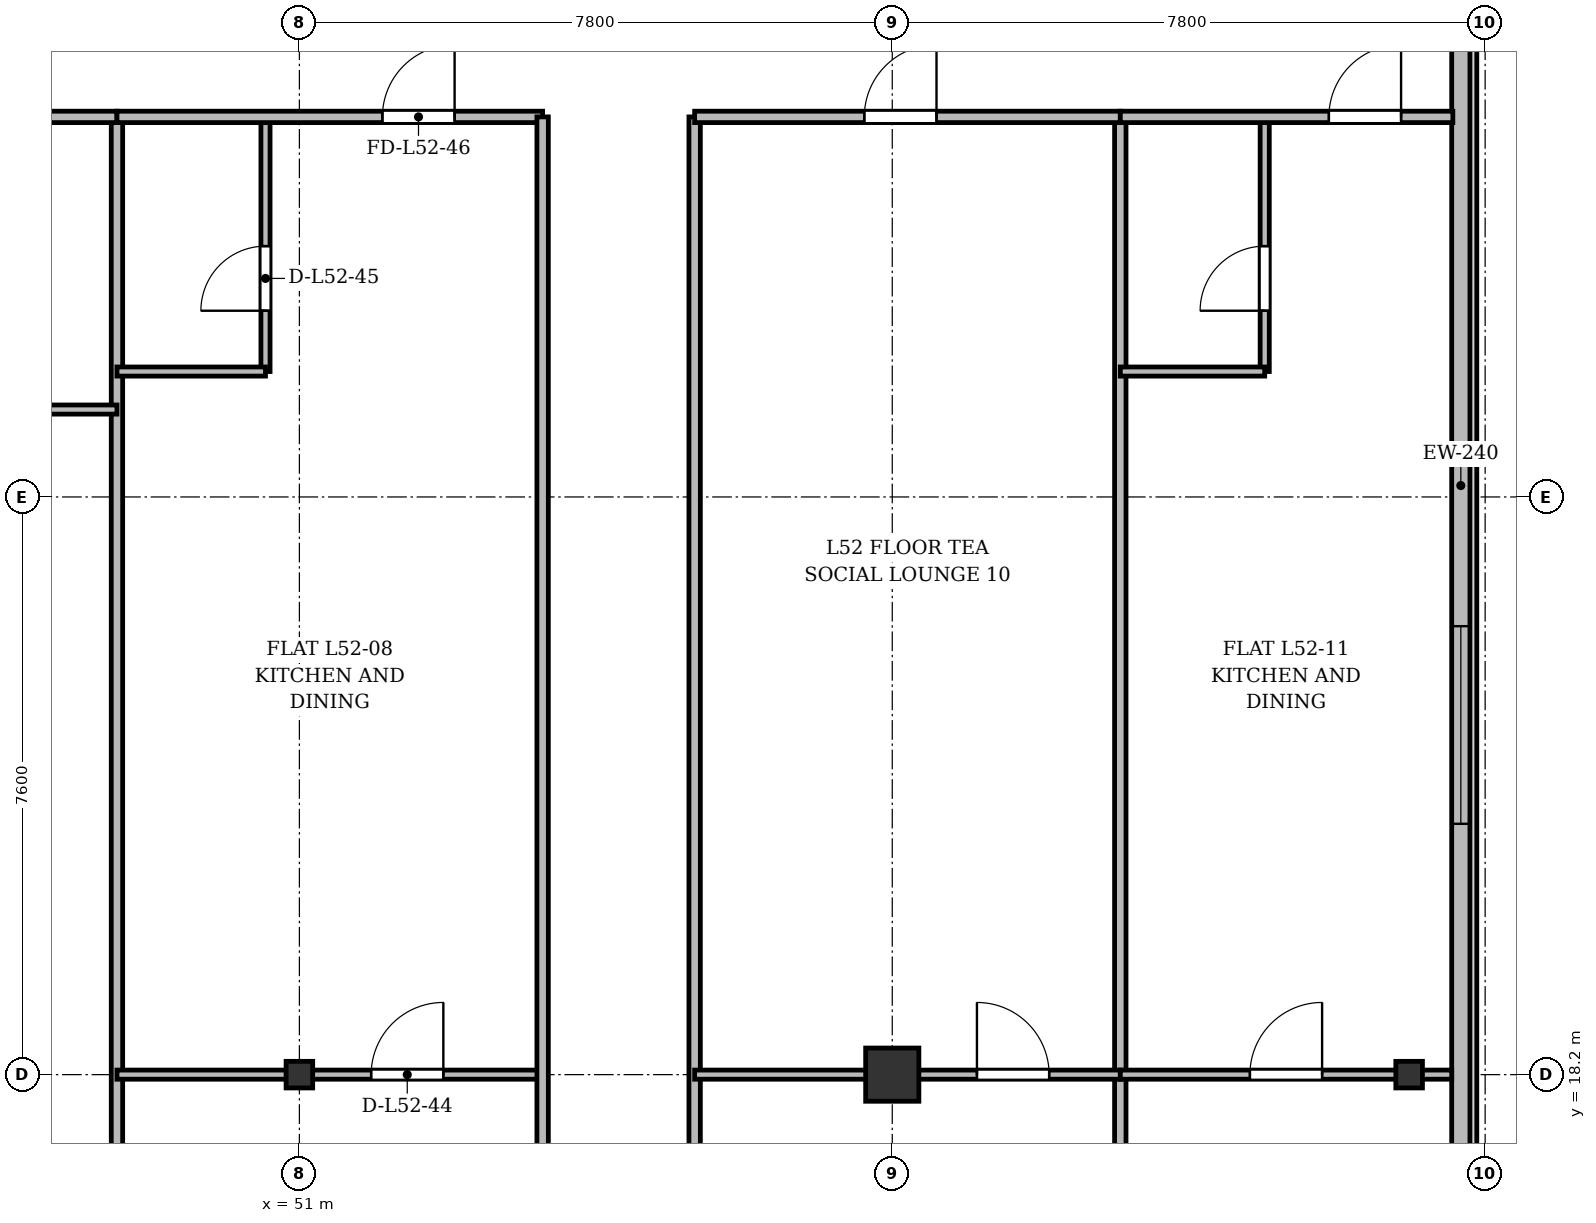
"""IFC4 building model, lengths in metres.
Left out: names, types, materials, properties, quantities, classifications, styles, units other than length and angle.
Written with IfcOpenShell. Run it as: python <this file> out.ifc"""

import sys

from ifc_helpers import new_model, si_unit, direction, frame, frame_2d, origin, origin_2d, place, context, subcontext, project, spatial, rectangle, i_section, extrude, source, transform, mapped, element, fill, save


model = new_model("IFC4")
c1 = context("Model", 3, precision=1e-05, world=origin(), true_north=direction((0.0, 1.0)))
c2 = subcontext(c1, "Body", "Model", "MODEL_VIEW")
j1 = project(units=[si_unit("LENGTHUNIT", "METRE"), si_unit("PLANEANGLEUNIT", "RADIAN")], contexts=[c1])
p1 = place(None, origin())
s1 = spatial("IfcSite", under=j1, at=p1, CompositionType="ELEMENT")
p2 = place(p1, origin())
s2 = spatial("IfcBuilding", under=s1, at=p2, CompositionType="ELEMENT")
p3 = place(p2, frame((0.0, 0.0, 201.3)))
s3 = spatial("IfcBuildingStorey", under=s2, at=p3, CompositionType="ELEMENT", Elevation=201.3)
m1 = source(origin(), c2, "Body", "SweptSolid", [
    extrude(i_section(OverallWidth=0.35, OverallDepth=0.35, WebThickness=0.018, FlangeThickness=0.028, at=origin_2d()), origin(), (0.0, 0.0, 1.0), 3.6),
])
p4 = place(p3, frame((51.0, 18.2, 0.0), z_axis=(0.0, 0.0, 1.0), x_axis=(1.0, 0.0, 0.0)))
e1 = element("IfcColumn", 1, at=p4, inside=s3, PredefinedType="COLUMN", context=c2, shape_type="MappedRepresentation", body=[
    mapped(m1, transform((0.0, 0.0, 0.0), x_axis=(1.0, 0.0, 0.0), y_axis=(0.0, 1.0, 0.0), z_axis=(0.0, 0.0, 1.0), scale=1.0)),
])
m2 = source(origin(), c2, "Body", "SweptSolid", [
    extrude(rectangle(XDim=0.7, YDim=0.7, at=origin_2d()), origin(), (0.0, 0.0, 1.0), 3.6),
])
p5 = place(p3, frame((58.8, 18.2, 0.0), z_axis=(0.0, 0.0, 1.0), x_axis=(1.0, 0.0, 0.0)))
e2 = element("IfcColumn", 2, at=p5, inside=s3, PredefinedType="COLUMN", context=c2, shape_type="MappedRepresentation", body=[
    mapped(m2, transform((0.0, 0.0, 0.0), x_axis=(1.0, 0.0, 0.0), y_axis=(0.0, 1.0, 0.0), z_axis=(0.0, 0.0, 1.0), scale=1.0)),
])
p6 = place(p3, frame((65.6, 18.2, 0.0), z_axis=(0.0, 0.0, 1.0), x_axis=(1.0, 0.0, 0.0)))
e3 = element("IfcColumn", 3, at=p6, inside=s3, PredefinedType="COLUMN", context=c2, shape_type="MappedRepresentation", body=[
    mapped(m1, transform((0.0, 0.0, 0.0), x_axis=(1.0, 0.0, 0.0), y_axis=(0.0, 1.0, 0.0), z_axis=(0.0, 0.0, 1.0), scale=1.0)),
])
p7 = place(p3, frame((66.28, 45.5, 0.0), z_axis=(0.0, 0.0, 1.0), x_axis=(0.0, -1.0, 0.0)))
e4 = element("IfcWall", 4, at=p7, inside=s3, PredefinedType="SOLIDWALL", context=c2, shape_type="SweptSolid", body=[
    extrude(rectangle(XDim=39.1, YDim=0.24, at=frame_2d((19.55, 0.0))), origin(), (0.0, 0.0, 1.0), 3.22),
])
p8 = place(p7, frame((36.45, 0.0, 0.92)))
e5 = element("IfcOpeningElement", 5, at=p8, cuts=e4, PredefinedType="OPENING", context=c2, shape_type="SweptSolid", body=[
    extrude(rectangle(XDim=1.2, YDim=1.65, at=frame_2d((0.6, 0.825))), frame((0.0, 0.13, 0.0), z_axis=(0.0, -1.0, 0.0), x_axis=(1.0, 0.0, 0.0)), (0.0, 0.0, 1.0), 0.26),
])
p9 = place(p7, frame((32.8, 0.0, 0.92)))
e6 = element("IfcOpeningElement", 6, at=p9, cuts=e4, PredefinedType="OPENING", context=c2, shape_type="SweptSolid", body=[
    extrude(rectangle(XDim=2.6, YDim=1.9, at=frame_2d((1.3, 0.95))), frame((0.0, 0.13, 0.0), z_axis=(0.0, -1.0, 0.0), x_axis=(1.0, 0.0, 0.0)), (0.0, 0.0, 1.0), 0.26),
])
p10 = place(p7, frame((28.6, 0.0, 0.92)))
e7 = element("IfcOpeningElement", 7, at=p10, cuts=e4, PredefinedType="OPENING", context=c2, shape_type="SweptSolid", body=[
    extrude(rectangle(XDim=2.6, YDim=1.9, at=frame_2d((1.3, 0.95))), frame((0.0, 0.13, 0.0), z_axis=(0.0, -1.0, 0.0), x_axis=(1.0, 0.0, 0.0)), (0.0, 0.0, 1.0), 0.26),
])
p11 = place(p7, frame((21.4, 0.0, 0.92)))
e8 = element("IfcOpeningElement", 8, at=p11, cuts=e4, PredefinedType="OPENING", context=c2, shape_type="SweptSolid", body=[
    extrude(rectangle(XDim=2.6, YDim=1.9, at=frame_2d((1.3, 0.95))), frame((0.0, 0.13, 0.0), z_axis=(0.0, -1.0, 0.0), x_axis=(1.0, 0.0, 0.0)), (0.0, 0.0, 1.0), 0.26),
])
p12 = place(p7, frame((7.4, 0.0, 0.92)))
e9 = element("IfcOpeningElement", 9, at=p12, cuts=e4, PredefinedType="OPENING", context=c2, shape_type="SweptSolid", body=[
    extrude(rectangle(XDim=2.6, YDim=1.9, at=frame_2d((1.3, 0.95))), frame((0.0, 0.13, 0.0), z_axis=(0.0, -1.0, 0.0), x_axis=(1.0, 0.0, 0.0)), (0.0, 0.0, 1.0), 0.26),
])
p13 = place(p7, frame((4.5, 0.0, 0.92)))
e10 = element("IfcOpeningElement", 10, at=p13, cuts=e4, PredefinedType="OPENING", context=c2, shape_type="SweptSolid", body=[
    extrude(rectangle(XDim=1.2, YDim=1.65, at=frame_2d((0.6, 0.825))), frame((0.0, 0.13, 0.0), z_axis=(0.0, -1.0, 0.0), x_axis=(1.0, 0.0, 0.0)), (0.0, 0.0, 1.0), 0.26),
])
p14 = place(p7, frame((1.15, 0.0, 0.92)))
e11 = element("IfcOpeningElement", 11, at=p14, cuts=e4, PredefinedType="OPENING", context=c2, shape_type="SweptSolid", body=[
    extrude(rectangle(XDim=1.2, YDim=1.65, at=frame_2d((0.6, 0.825))), frame((0.0, 0.13, 0.0), z_axis=(0.0, -1.0, 0.0), x_axis=(1.0, 0.0, 0.0)), (0.0, 0.0, 1.0), 0.26),
])
for number, where, z_axis, x_axis in (
    (12, (48.6, 3.625, 0.0), (0.0, 0.0, 1.0), (0.0, 1.0, 0.0)),
    (13, (61.8, 3.625, 0.0), (0.0, 0.0, 1.0), (0.0, 1.0, 0.0)),
):
    element("IfcWall", number, at=place(p3, frame(where, z_axis=z_axis, x_axis=x_axis)), inside=s3, PredefinedType="PARTITIONING", context=c2, shape_type="SweptSolid", body=[
        extrude(rectangle(XDim=27.175, YDim=0.15, at=frame_2d((13.587, 0.0))), origin(), (0.0, 0.0, 1.0), 2.77),
    ])
p15 = place(p3, frame((44.0, 30.8, 0.0), z_axis=(0.0, 0.0, 1.0), x_axis=(1.0, 0.0, 0.0)))
e14 = element("IfcWall", 14, at=p15, inside=s3, PredefinedType="PARTITIONING", context=c2, shape_type="SweptSolid", body=[
    extrude(rectangle(XDim=4.6, YDim=0.15, at=frame_2d((2.3, 0.0))), origin(), (0.0, 0.0, 1.0), 3.22),
])
p16 = place(p15, frame((1.825, 0.0, 0.0)))
e15 = element("IfcOpeningElement", 15, at=p16, cuts=e14, PredefinedType="OPENING", context=c2, shape_type="SweptSolid", body=[
    extrude(rectangle(XDim=0.95, YDim=2.15, at=frame_2d((0.475, 1.075))), frame((0.0, 0.085, 0.0), z_axis=(0.0, -1.0, 0.0), x_axis=(1.0, 0.0, 0.0)), (0.0, 0.0, 1.0), 0.17),
])
p17 = place(p3, frame((44.025, 26.95, 0.0), z_axis=(0.0, 0.0, 1.0), x_axis=(1.0, 0.0, 0.0)))
e16 = element("IfcWall", 16, at=p17, inside=s3, PredefinedType="PARTITIONING", context=c2, shape_type="SweptSolid", body=[
    extrude(rectangle(XDim=4.575, YDim=0.12, at=frame_2d((2.288, 0.0))), origin(), (0.0, 0.0, 1.0), 3.22),
])
p18 = place(p17, frame((1.717, 0.0, 0.0)))
e17 = element("IfcOpeningElement", 17, at=p18, cuts=e16, PredefinedType="OPENING", context=c2, shape_type="SweptSolid", body=[
    extrude(rectangle(XDim=0.95, YDim=2.15, at=frame_2d((0.475, 1.075))), frame((0.0, 0.07, 0.0), z_axis=(0.0, -1.0, 0.0), x_axis=(1.0, 0.0, 0.0)), (0.0, 0.0, 1.0), 0.14),
])
p19 = place(p3, frame((48.6, 18.2, 0.0), z_axis=(0.0, 0.0, 1.0), x_axis=(1.0, 0.0, 0.0)))
e18 = element("IfcWall", 18, at=p19, inside=s3, PredefinedType="PARTITIONING", context=c2, shape_type="SweptSolid", body=[
    extrude(rectangle(XDim=5.6, YDim=0.12, at=frame_2d((2.8, 0.0))), origin(), (0.0, 0.0, 1.0), 2.77),
])
p20 = place(p19, frame((3.344, 0.0, 0.0)))
e19 = element("IfcOpeningElement", 19, at=p20, cuts=e18, PredefinedType="OPENING", context=c2, shape_type="SweptSolid", body=[
    extrude(rectangle(XDim=0.95, YDim=2.15, at=frame_2d((0.475, 1.075))), frame((0.0, 0.07, 0.0), z_axis=(0.0, -1.0, 0.0), x_axis=(1.0, 0.0, 0.0)), (0.0, 0.0, 1.0), 0.14),
])
p21 = place(p3, frame((50.554, 27.45, 0.0), z_axis=(0.0, 0.0, 1.0), x_axis=(0.0, 1.0, 0.0)))
e20 = element("IfcWall", 20, at=p21, inside=s3, PredefinedType="PARTITIONING", context=c2, shape_type="SweptSolid", body=[
    extrude(rectangle(XDim=3.35, YDim=0.12, at=frame_2d((1.675, 0.0))), origin(), (0.0, 0.0, 1.0), 3.22),
])
p22 = place(p21, frame((0.8, 0.0, 0.0)))
e21 = element("IfcOpeningElement", 21, at=p22, cuts=e20, PredefinedType="OPENING", context=c2, shape_type="SweptSolid", body=[
    extrude(rectangle(XDim=0.85, YDim=2.1, at=frame_2d((0.425, 1.05))), frame((0.0, 0.07, 0.0), z_axis=(0.0, -1.0, 0.0), x_axis=(1.0, 0.0, 0.0)), (0.0, 0.0, 1.0), 0.14),
])
p23 = place(p3, frame((48.6, 27.45, 0.0), z_axis=(0.0, 0.0, 1.0), x_axis=(1.0, 0.0, 0.0)))
e22 = element("IfcWall", 22, at=p23, inside=s3, PredefinedType="PARTITIONING", context=c2, shape_type="SweptSolid", body=[
    extrude(rectangle(XDim=1.954, YDim=0.12, at=frame_2d((0.977, 0.0))), origin(), (0.0, 0.0, 1.0), 3.22),
])
p24 = place(p3, frame((48.6, 30.8, 0.0), z_axis=(0.0, 0.0, 1.0), x_axis=(1.0, 0.0, 0.0)))
e23 = element("IfcWall", 23, at=p24, inside=s3, PredefinedType="PARTITIONING", context=c2, shape_type="SweptSolid", body=[
    extrude(rectangle(XDim=5.6, YDim=0.15, at=frame_2d((2.8, 0.0))), origin(), (0.0, 0.0, 1.0), 2.72),
])
p25 = place(p24, frame((3.492, 0.0, 0.0)))
e24 = element("IfcOpeningElement", 24, at=p25, cuts=e23, PredefinedType="OPENING", context=c2, shape_type="SweptSolid", body=[
    extrude(rectangle(XDim=0.95, YDim=2.15, at=frame_2d((0.475, 1.075))), frame((0.0, 0.085, 0.0), z_axis=(0.0, -1.0, 0.0), x_axis=(1.0, 0.0, 0.0)), (0.0, 0.0, 1.0), 0.17),
])
for number, where, z_axis, x_axis in (
    (25, (54.2, 3.625, 0.0), (0.0, 0.0, 1.0), (0.0, 1.0, 0.0)),
    (26, (56.2, 3.625, 0.0), (0.0, 0.0, 1.0), (0.0, 1.0, 0.0)),
):
    element("IfcWall", number, at=place(p3, frame(where, z_axis=z_axis, x_axis=x_axis)), inside=s3, PredefinedType="PARTITIONING", context=c2, shape_type="SweptSolid", body=[
        extrude(rectangle(XDim=27.175, YDim=0.15, at=frame_2d((13.587, 0.0))), origin(), (0.0, 0.0, 1.0), 2.77),
    ])
p26 = place(p3, frame((56.2, 30.8, 0.0), z_axis=(0.0, 0.0, 1.0), x_axis=(1.0, 0.0, 0.0)))
e27 = element("IfcWall", 27, at=p26, inside=s3, PredefinedType="PARTITIONING", context=c2, shape_type="SweptSolid", body=[
    extrude(rectangle(XDim=5.6, YDim=0.15, at=frame_2d((2.8, 0.0))), origin(), (0.0, 0.0, 1.0), 2.72),
])
p27 = place(p26, frame((2.232, 0.0, 0.0)))
e28 = element("IfcOpeningElement", 28, at=p27, cuts=e27, PredefinedType="OPENING", context=c2, shape_type="SweptSolid", body=[
    extrude(rectangle(XDim=0.95, YDim=2.15, at=frame_2d((0.475, 1.075))), frame((0.0, 0.085, 0.0), z_axis=(0.0, -1.0, 0.0), x_axis=(1.0, 0.0, 0.0)), (0.0, 0.0, 1.0), 0.17),
])
p28 = place(p3, frame((56.2, 18.2, 0.0), z_axis=(0.0, 0.0, 1.0), x_axis=(1.0, 0.0, 0.0)))
e29 = element("IfcWall", 29, at=p28, inside=s3, PredefinedType="PARTITIONING", context=c2, shape_type="SweptSolid", body=[
    extrude(rectangle(XDim=5.6, YDim=0.12, at=frame_2d((2.8, 0.0))), origin(), (0.0, 0.0, 1.0), 2.77),
])
p29 = place(p28, frame((3.714, 0.0, 0.0)))
e30 = element("IfcOpeningElement", 30, at=p29, cuts=e29, PredefinedType="OPENING", context=c2, shape_type="SweptSolid", body=[
    extrude(rectangle(XDim=0.95, YDim=2.15, at=frame_2d((0.475, 1.075))), frame((0.0, 0.07, 0.0), z_axis=(0.0, -1.0, 0.0), x_axis=(1.0, 0.0, 0.0)), (0.0, 0.0, 1.0), 0.14),
])
p30 = place(p3, frame((61.8, 18.2, 0.0), z_axis=(0.0, 0.0, 1.0), x_axis=(1.0, 0.0, 0.0)))
e31 = element("IfcWall", 31, at=p30, inside=s3, PredefinedType="PARTITIONING", context=c2, shape_type="SweptSolid", body=[
    extrude(rectangle(XDim=4.36, YDim=0.12, at=frame_2d((2.18, 0.0))), origin(), (0.0, 0.0, 1.0), 2.77),
])
p31 = place(p30, frame((1.705, 0.0, 0.0)))
e32 = element("IfcOpeningElement", 32, at=p31, cuts=e31, PredefinedType="OPENING", context=c2, shape_type="SweptSolid", body=[
    extrude(rectangle(XDim=0.95, YDim=2.15, at=frame_2d((0.475, 1.075))), frame((0.0, 0.07, 0.0), z_axis=(0.0, -1.0, 0.0), x_axis=(1.0, 0.0, 0.0)), (0.0, 0.0, 1.0), 0.14),
])
p32 = place(p3, frame((63.7, 27.45, 0.0), z_axis=(0.0, 0.0, 1.0), x_axis=(0.0, 1.0, 0.0)))
e33 = element("IfcWall", 33, at=p32, inside=s3, PredefinedType="PARTITIONING", context=c2, shape_type="SweptSolid", body=[
    extrude(rectangle(XDim=3.35, YDim=0.12, at=frame_2d((1.675, 0.0))), origin(), (0.0, 0.0, 1.0), 3.22),
])
p33 = place(p32, frame((0.8, 0.0, 0.0)))
e34 = element("IfcOpeningElement", 34, at=p33, cuts=e33, PredefinedType="OPENING", context=c2, shape_type="SweptSolid", body=[
    extrude(rectangle(XDim=0.85, YDim=2.1, at=frame_2d((0.425, 1.05))), frame((0.0, 0.07, 0.0), z_axis=(0.0, -1.0, 0.0), x_axis=(1.0, 0.0, 0.0)), (0.0, 0.0, 1.0), 0.14),
])
p34 = place(p3, frame((61.8, 27.45, 0.0), z_axis=(0.0, 0.0, 1.0), x_axis=(1.0, 0.0, 0.0)))
e35 = element("IfcWall", 35, at=p34, inside=s3, PredefinedType="PARTITIONING", context=c2, shape_type="SweptSolid", body=[
    extrude(rectangle(XDim=1.9, YDim=0.12, at=frame_2d((0.95, 0.0))), origin(), (0.0, 0.0, 1.0), 3.22),
])
p35 = place(p3, frame((61.8, 30.8, 0.0), z_axis=(0.0, 0.0, 1.0), x_axis=(1.0, 0.0, 0.0)))
e36 = element("IfcWall", 36, at=p35, inside=s3, PredefinedType="PARTITIONING", context=c2, shape_type="SweptSolid", body=[
    extrude(rectangle(XDim=4.375, YDim=0.15, at=frame_2d((2.188, 0.0))), origin(), (0.0, 0.0, 1.0), 2.72),
])
p36 = place(p35, frame((2.744, 0.0, 0.0)))
e37 = element("IfcOpeningElement", 37, at=p36, cuts=e36, PredefinedType="OPENING", context=c2, shape_type="SweptSolid", body=[
    extrude(rectangle(XDim=0.95, YDim=2.15, at=frame_2d((0.475, 1.075))), frame((0.0, 0.085, 0.0), z_axis=(0.0, -1.0, 0.0), x_axis=(1.0, 0.0, 0.0)), (0.0, 0.0, 1.0), 0.17),
])
m3 = source(origin(), c2, "Body", "SweptSolid", [
    extrude(rectangle(XDim=2.6, YDim=1.9, at=frame_2d((1.3, 0.95))), frame((0.0, 0.03, 0.0), z_axis=(0.0, -1.0, 0.0), x_axis=(1.0, 0.0, 0.0)), (0.0, 0.0, 1.0), 0.06),
])
p37 = place(p11, origin())
e38 = element("IfcWindow", 38, at=p37, inside=s3, PartitioningType="SINGLE_PANEL", PredefinedType="WINDOW", context=c2, shape_type="MappedRepresentation", body=[
    mapped(m3, transform((0.0, 0.0, 0.0), x_axis=(1.0, 0.0, 0.0), y_axis=(0.0, 1.0, 0.0), z_axis=(0.0, 0.0, 1.0), scale=1.0)),
])
fill(e8, e38)
m4 = source(origin(), c2, "Body", "SweptSolid", [
    extrude(rectangle(XDim=0.95, YDim=2.15, at=frame_2d((0.475, 1.075))), frame((0.0, 0.025, 0.0), z_axis=(0.0, -1.0, 0.0), x_axis=(1.0, 0.0, 0.0)), (0.0, 0.0, 1.0), 0.05),
])
p38 = place(p20, origin())
e39 = element("IfcDoor", 39, at=p38, inside=s3, OperationType="SINGLE_SWING_RIGHT", PredefinedType="DOOR", context=c2, shape_type="MappedRepresentation", body=[
    mapped(m4, transform((0.0, 0.0, 0.0), x_axis=(1.0, 0.0, 0.0), y_axis=(0.0, 1.0, 0.0), z_axis=(0.0, 0.0, 1.0), scale=1.0)),
])
fill(e19, e39)
m5 = source(origin(), c2, "Body", "SweptSolid", [
    extrude(rectangle(XDim=0.85, YDim=2.1, at=frame_2d((0.425, 1.05))), frame((0.0, 0.025, 0.0), z_axis=(0.0, -1.0, 0.0), x_axis=(1.0, 0.0, 0.0)), (0.0, 0.0, 1.0), 0.05),
])
p39 = place(p22, origin())
e40 = element("IfcDoor", 40, at=p39, inside=s3, OperationType="SINGLE_SWING_LEFT", PredefinedType="DOOR", context=c2, shape_type="MappedRepresentation", body=[
    mapped(m5, transform((0.0, 0.0, 0.0), x_axis=(1.0, 0.0, 0.0), y_axis=(0.0, 1.0, 0.0), z_axis=(0.0, 0.0, 1.0), scale=1.0)),
])
fill(e21, e40)
p40 = place(p25, origin())
e41 = element("IfcDoor", 41, at=p40, inside=s3, OperationType="SINGLE_SWING_RIGHT", PredefinedType="DOOR", context=c2, shape_type="MappedRepresentation", body=[
    mapped(m4, transform((0.0, 0.0, 0.0), x_axis=(1.0, 0.0, 0.0), y_axis=(0.0, 1.0, 0.0), z_axis=(0.0, 0.0, 1.0), scale=1.0)),
])
fill(e24, e41)
p41 = place(p27, origin())
e42 = element("IfcDoor", 42, at=p41, inside=s3, OperationType="SINGLE_SWING_RIGHT", PredefinedType="DOOR", context=c2, shape_type="MappedRepresentation", body=[
    mapped(m4, transform((0.0, 0.0, 0.0), x_axis=(1.0, 0.0, 0.0), y_axis=(0.0, 1.0, 0.0), z_axis=(0.0, 0.0, 1.0), scale=1.0)),
])
fill(e28, e42)
p42 = place(p29, origin())
e43 = element("IfcDoor", 43, at=p42, inside=s3, OperationType="SINGLE_SWING_LEFT", PredefinedType="DOOR", context=c2, shape_type="MappedRepresentation", body=[
    mapped(m4, transform((0.0, 0.0, 0.0), x_axis=(1.0, 0.0, 0.0), y_axis=(0.0, 1.0, 0.0), z_axis=(0.0, 0.0, 1.0), scale=1.0)),
])
fill(e30, e43)
p43 = place(p31, origin())
e44 = element("IfcDoor", 44, at=p43, inside=s3, OperationType="SINGLE_SWING_RIGHT", PredefinedType="DOOR", context=c2, shape_type="MappedRepresentation", body=[
    mapped(m4, transform((0.0, 0.0, 0.0), x_axis=(1.0, 0.0, 0.0), y_axis=(0.0, 1.0, 0.0), z_axis=(0.0, 0.0, 1.0), scale=1.0)),
])
fill(e32, e44)
p44 = place(p33, origin())
e45 = element("IfcDoor", 45, at=p44, inside=s3, OperationType="SINGLE_SWING_LEFT", PredefinedType="DOOR", context=c2, shape_type="MappedRepresentation", body=[
    mapped(m5, transform((0.0, 0.0, 0.0), x_axis=(1.0, 0.0, 0.0), y_axis=(0.0, 1.0, 0.0), z_axis=(0.0, 0.0, 1.0), scale=1.0)),
])
fill(e34, e45)
p45 = place(p36, origin())
e46 = element("IfcDoor", 46, at=p45, inside=s3, OperationType="SINGLE_SWING_RIGHT", PredefinedType="DOOR", context=c2, shape_type="MappedRepresentation", body=[
    mapped(m4, transform((0.0, 0.0, 0.0), x_axis=(1.0, 0.0, 0.0), y_axis=(0.0, 1.0, 0.0), z_axis=(0.0, 0.0, 1.0), scale=1.0)),
])
fill(e37, e46)
save(model, sys.argv[1])
